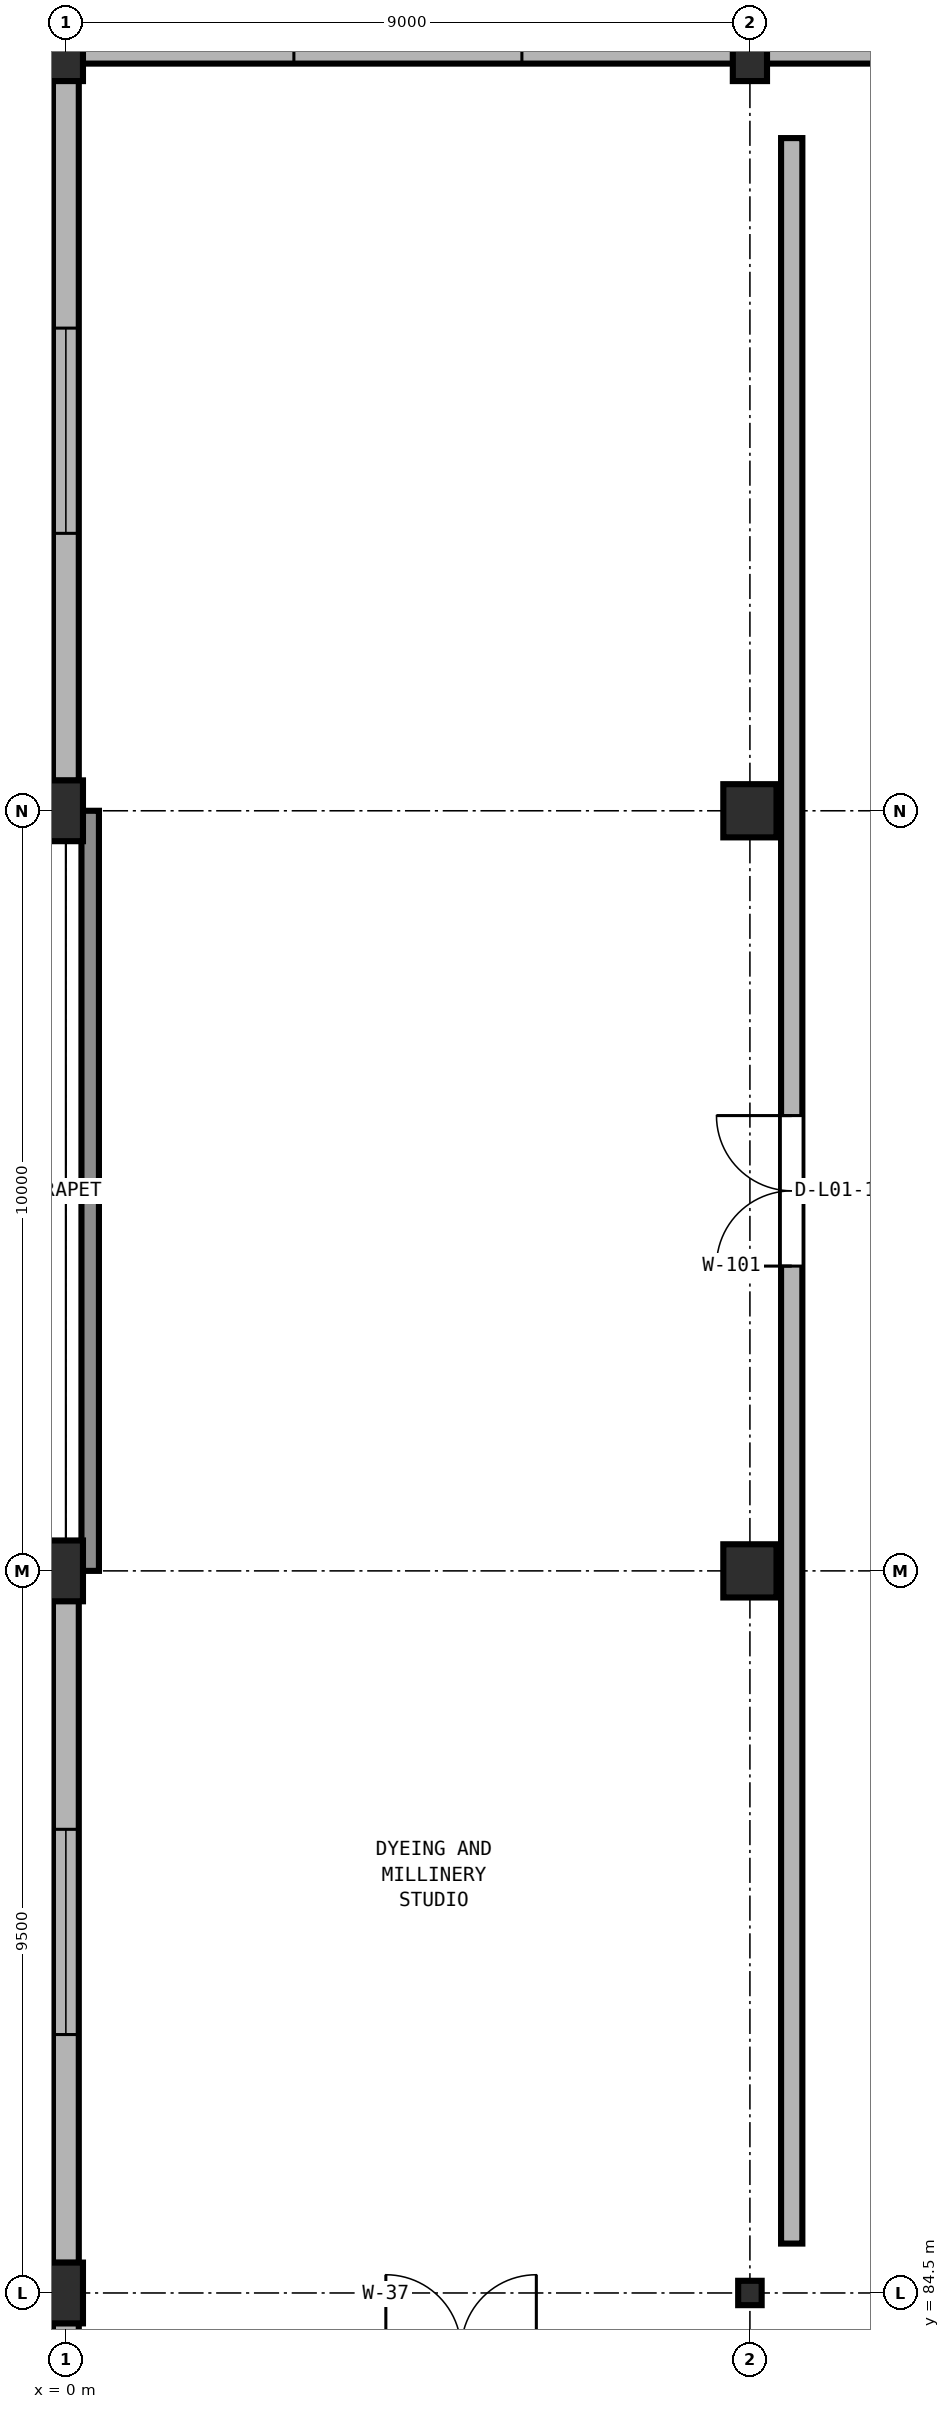
"""IFC4 building model, lengths in metres.
Left out: names, types, materials, properties, quantities, classifications, styles, units other than length and angle.
Written with IfcOpenShell. Run it as: python <this file> out.ifc"""

import sys

from ifc_helpers import new_model, si_unit, direction, frame, frame_2d, origin, origin_2d, place, context, subcontext, project, spatial, rectangle, i_section, extrude, element, fill, save


model = new_model("IFC4")
c1 = context("Model", 3, precision=1e-05, world=origin(), true_north=direction((0.0, 1.0)))
c2 = subcontext(c1, "Body", "Model", "MODEL_VIEW")
j1 = project(units=[si_unit("LENGTHUNIT", "METRE"), si_unit("PLANEANGLEUNIT", "RADIAN")], contexts=[c1])
p1 = place(None, origin())
s1 = spatial("IfcSite", under=j1, at=p1, CompositionType="ELEMENT")
p2 = place(p1, origin())
s2 = spatial("IfcBuilding", under=s1, at=p2, CompositionType="ELEMENT")
p3 = place(p2, frame((0.0, 0.0, 5.4)))
s3 = spatial("IfcBuildingStorey", under=s2, at=p3, CompositionType="ELEMENT", Elevation=5.4)
for number, where, z_axis, x_axis in (
    (1, (0.0, 84.5, 0.0), (0.0, 0.0, 1.0), (1.0, 0.0, 0.0)),
    (2, (0.0, 94.0, 0.0), (0.0, 0.0, 1.0), (1.0, 0.0, 0.0)),
    (3, (0.0, 104.0, 0.0), (0.0, 0.0, 1.0), (1.0, 0.0, 0.0)),
    (4, (0.0, 114.0, 0.0), (0.0, 0.0, 1.0), (1.0, 0.0, 0.0)),
):
    element("IfcColumn", number, at=place(p3, frame(where, z_axis=z_axis, x_axis=x_axis)), inside=s3, PredefinedType="PILASTER", context=c2, shape_type="SweptSolid", body=[
        extrude(rectangle(XDim=0.45, YDim=0.8, at=origin_2d()), origin(), (0.0, 0.0, 1.0), 4.54),
    ])
p4 = place(p3, frame((9.0, 84.5, 0.0), z_axis=(0.0, 0.0, 1.0), x_axis=(1.0, 0.0, 0.0)))
e5 = element("IfcColumn", 5, at=p4, inside=s3, PredefinedType="COLUMN", context=c2, shape_type="SweptSolid", body=[
    extrude(i_section(OverallWidth=0.309, OverallDepth=0.321, WebThickness=0.014, FlangeThickness=0.022, FilletRadius=0.017, at=origin_2d()), origin(), (0.0, 0.0, 1.0), 4.54),
])
for number, where, z_axis, x_axis in (
    (6, (9.0, 94.0, 0.0), (0.0, 0.0, 1.0), (1.0, 0.0, 0.0)),
    (7, (9.0, 104.0, 0.0), (0.0, 0.0, 1.0), (1.0, 0.0, 0.0)),
):
    element("IfcColumn", number, at=place(p3, frame(where, z_axis=z_axis, x_axis=x_axis)), inside=s3, PredefinedType="COLUMN", context=c2, shape_type="SweptSolid", body=[
        extrude(rectangle(XDim=0.7, YDim=0.7, at=origin_2d()), origin(), (0.0, 0.0, 1.0), 4.54),
    ])
p5 = place(p3, frame((9.0, 114.0, 0.0), z_axis=(0.0, 0.0, 1.0), x_axis=(1.0, 0.0, 0.0)))
e8 = element("IfcColumn", 8, at=p5, inside=s3, PredefinedType="PILASTER", context=c2, shape_type="SweptSolid", body=[
    extrude(rectangle(XDim=0.45, YDim=0.8, at=origin_2d()), origin(), (0.0, 0.0, 1.0), 4.54),
])
p6 = place(p3, frame((0.0, 75.396, 0.0), z_axis=(0.0, 0.0, 1.0), x_axis=(0.0, 1.0, 0.0)))
e9 = element("IfcWall", 9, at=p6, inside=s3, PredefinedType="SOLIDWALL", context=c2, shape_type="SweptSolid", body=[
    extrude(rectangle(XDim=8.708, YDim=0.34, at=frame_2d((4.354, 0.0))), origin(), (0.0, 0.0, 1.0), 4.152),
])
p7 = place(p6, frame((3.004, 0.0, 2.0)))
e10 = element("IfcOpeningElement", 10, at=p7, cuts=e9, PredefinedType="OPENING", context=c2, shape_type="SweptSolid", body=[
    extrude(rectangle(XDim=2.7, YDim=1.3, at=frame_2d((1.35, 0.65))), frame((0.0, 0.18, 0.0), z_axis=(0.0, -1.0, 0.0), x_axis=(1.0, 0.0, 0.0)), (0.0, 0.0, 1.0), 0.36),
])
p8 = place(p3, frame((0.0, 84.896, 0.0), z_axis=(0.0, 0.0, 1.0), x_axis=(0.0, 1.0, 0.0)))
e11 = element("IfcWall", 11, at=p8, inside=s3, PredefinedType="SOLIDWALL", context=c2, shape_type="SweptSolid", body=[
    extrude(rectangle(XDim=8.708, YDim=0.34, at=frame_2d((4.354, 0.0))), origin(), (0.0, 0.0, 1.0), 4.152),
])
p9 = place(p8, frame((3.004, 0.0, 2.0)))
e12 = element("IfcOpeningElement", 12, at=p9, cuts=e11, PredefinedType="OPENING", context=c2, shape_type="SweptSolid", body=[
    extrude(rectangle(XDim=2.7, YDim=1.3, at=frame_2d((1.35, 0.65))), frame((0.0, 0.18, 0.0), z_axis=(0.0, -1.0, 0.0), x_axis=(1.0, 0.0, 0.0)), (0.0, 0.0, 1.0), 0.36),
])
p10 = place(p3, frame((0.0, 104.396, 0.0), z_axis=(0.0, 0.0, 1.0), x_axis=(0.0, 1.0, 0.0)))
e13 = element("IfcWall", 13, at=p10, inside=s3, PredefinedType="SOLIDWALL", context=c2, shape_type="SweptSolid", body=[
    extrude(rectangle(XDim=9.208, YDim=0.34, at=frame_2d((4.604, 0.0))), origin(), (0.0, 0.0, 1.0), 4.152),
])
p11 = place(p10, frame((3.254, 0.0, 2.0)))
e14 = element("IfcOpeningElement", 14, at=p11, cuts=e13, PredefinedType="OPENING", context=c2, shape_type="SweptSolid", body=[
    extrude(rectangle(XDim=2.7, YDim=1.3, at=frame_2d((1.35, 0.65))), frame((0.0, 0.18, 0.0), z_axis=(0.0, -1.0, 0.0), x_axis=(1.0, 0.0, 0.0)), (0.0, 0.0, 1.0), 0.36),
])
p12 = place(p3, frame((0.221, 114.0, 0.0), z_axis=(0.0, 0.0, 1.0), x_axis=(1.0, 0.0, 0.0)))
e15 = element("IfcWall", 15, at=p12, inside=s3, PredefinedType="SOLIDWALL", context=c2, shape_type="SweptSolid", body=[
    extrude(rectangle(XDim=8.558, YDim=0.34, at=frame_2d((4.279, 0.0))), origin(), (0.0, 0.0, 1.0), 4.191),
])
p13 = place(p12, frame((2.779, 0.0, 2.0)))
e16 = element("IfcOpeningElement", 16, at=p13, cuts=e15, PredefinedType="OPENING", context=c2, shape_type="SweptSolid", body=[
    extrude(rectangle(XDim=3.0, YDim=1.4, at=frame_2d((1.5, 0.7))), frame((0.0, 0.18, 0.0), z_axis=(0.0, -1.0, 0.0), x_axis=(1.0, 0.0, 0.0)), (0.0, 0.0, 1.0), 0.36),
])
p14 = place(p3, frame((9.221, 114.0, 0.0), z_axis=(0.0, 0.0, 1.0), x_axis=(1.0, 0.0, 0.0)))
e17 = element("IfcWall", 17, at=p14, inside=s3, PredefinedType="SOLIDWALL", context=c2, shape_type="SweptSolid", body=[
    extrude(rectangle(XDim=8.558, YDim=0.34, at=frame_2d((4.279, 0.0))), origin(), (0.0, 0.0, 1.0), 4.191),
])
p15 = place(p14, frame((2.779, 0.0, 2.0)))
e18 = element("IfcOpeningElement", 18, at=p15, cuts=e17, PredefinedType="OPENING", context=c2, shape_type="SweptSolid", body=[
    extrude(rectangle(XDim=3.0, YDim=1.4, at=frame_2d((1.5, 0.7))), frame((0.0, 0.18, 0.0), z_axis=(0.0, -1.0, 0.0), x_axis=(1.0, 0.0, 0.0)), (0.0, 0.0, 1.0), 0.36),
])
p16 = place(p3, frame((0.32, 94.0, 0.0), z_axis=(0.0, 0.0, 1.0), x_axis=(0.0, 1.0, 0.0)))
e19 = element("IfcWall", 19, at=p16, inside=s3, PredefinedType="PARAPET", context=c2, shape_type="SweptSolid", body=[
    extrude(rectangle(XDim=10.0, YDim=0.23, at=frame_2d((5.0, 0.0))), origin(), (0.0, 0.0, 1.0), 1.15),
])
p17 = place(p3, frame((9.55, 85.15, 0.0), z_axis=(0.0, 0.0, 1.0), x_axis=(0.0, 1.0, 0.0)))
e20 = element("IfcWall", 20, at=p17, inside=s3, PredefinedType="PARTITIONING", context=c2, shape_type="SweptSolid", body=[
    extrude(rectangle(XDim=27.7, YDim=0.28, at=frame_2d((13.85, 0.0))), origin(), (0.0, 0.0, 1.0), 4.49),
])
p18 = place(p17, frame((12.86, 0.0, 0.0)))
e21 = element("IfcOpeningElement", 21, at=p18, cuts=e20, PredefinedType="OPENING", context=c2, shape_type="SweptSolid", body=[
    extrude(rectangle(XDim=1.98, YDim=2.42, at=frame_2d((0.99, 1.21))), frame((0.0, 0.15, 0.0), z_axis=(0.0, -1.0, 0.0), x_axis=(1.0, 0.0, 0.0)), (0.0, 0.0, 1.0), 0.3),
])
p19 = place(p9, origin())
e22 = element("IfcWindow", 22, at=p19, inside=s3, PartitioningType="SINGLE_PANEL", PredefinedType="WINDOW", context=c2, shape_type="SweptSolid", body=[
    extrude(rectangle(XDim=2.7, YDim=1.3, at=frame_2d((1.35, 0.65))), frame((0.0, 0.03, 0.0), z_axis=(0.0, -1.0, 0.0), x_axis=(1.0, 0.0, 0.0)), (0.0, 0.0, 1.0), 0.06),
])
fill(e12, e22)
p20 = place(p11, origin())
e23 = element("IfcWindow", 23, at=p20, inside=s3, PartitioningType="SINGLE_PANEL", PredefinedType="WINDOW", context=c2, shape_type="SweptSolid", body=[
    extrude(rectangle(XDim=2.7, YDim=1.3, at=frame_2d((1.35, 0.65))), frame((0.0, 0.03, 0.0), z_axis=(0.0, -1.0, 0.0), x_axis=(1.0, 0.0, 0.0)), (0.0, 0.0, 1.0), 0.06),
])
fill(e14, e23)
p21 = place(p13, origin())
e24 = element("IfcWindow", 24, at=p21, inside=s3, PartitioningType="SINGLE_PANEL", PredefinedType="WINDOW", context=c2, shape_type="SweptSolid", body=[
    extrude(rectangle(XDim=3.0, YDim=1.4, at=frame_2d((1.5, 0.7))), frame((0.0, 0.03, 0.0), z_axis=(0.0, -1.0, 0.0), x_axis=(1.0, 0.0, 0.0)), (0.0, 0.0, 1.0), 0.06),
])
fill(e16, e24)
p22 = place(p18, origin())
e25 = element("IfcDoor", 25, at=p22, inside=s3, OperationType="DOUBLE_DOOR_SINGLE_SWING", PredefinedType="DOOR", context=c2, shape_type="SweptSolid", body=[
    extrude(rectangle(XDim=1.98, YDim=2.42, at=frame_2d((0.99, 1.21))), frame((0.0, 0.025, 0.0), z_axis=(0.0, -1.0, 0.0), x_axis=(1.0, 0.0, 0.0)), (0.0, 0.0, 1.0), 0.05),
])
fill(e21, e25)
save(model, sys.argv[1])
